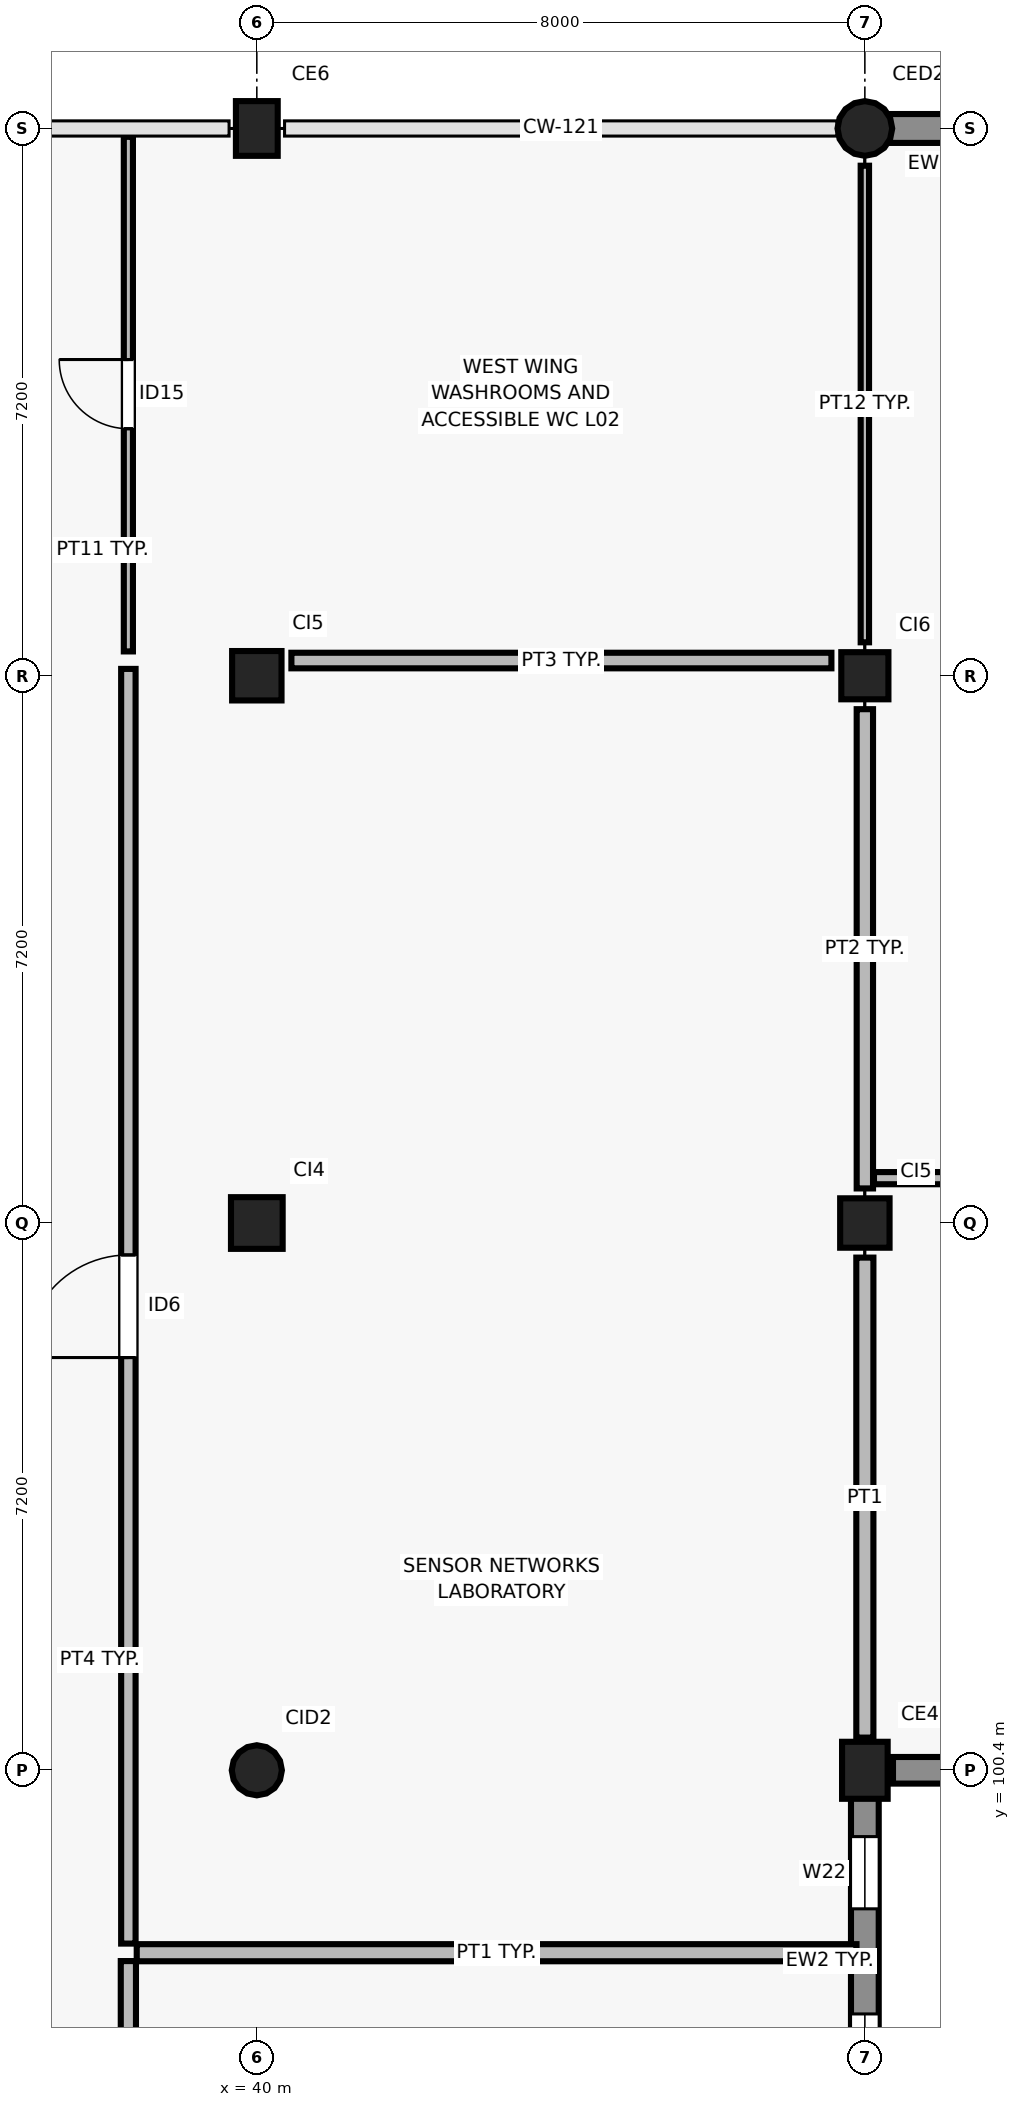
"""IFC4 building model, lengths in metres.
Left out: names, types, materials, properties, quantities, classifications, styles, units other than length and angle.
Written with IfcOpenShell. Run it as: python <this file> out.ifc"""

import sys

from ifc_helpers import new_model, si_unit, direction, frame, frame_2d, origin, origin_2d, place, context, subcontext, project, spatial, rectangle, circle, extrude, element, fill, save


model = new_model("IFC4")
c1 = context("Model", 3, precision=1e-05, world=origin(), true_north=direction((0.0, 1.0)))
c2 = subcontext(c1, "Body", "Model", "MODEL_VIEW")
j1 = project(units=[si_unit("LENGTHUNIT", "METRE"), si_unit("PLANEANGLEUNIT", "RADIAN")], contexts=[c1])
p1 = place(None, origin())
s1 = spatial("IfcSite", under=j1, at=p1, CompositionType="ELEMENT")
p2 = place(p1, origin())
s2 = spatial("IfcBuilding", under=s1, at=p2, CompositionType="ELEMENT")
p3 = place(p2, frame((0.0, 0.0, 9.0)))
s3 = spatial("IfcBuildingStorey", under=s2, at=p3, CompositionType="ELEMENT", Elevation=9.0)
p4 = place(p3, frame((40.0, 100.4, 0.0), z_axis=(0.0, 0.0, 1.0), x_axis=(1.0, 0.0, 0.0)))
e1 = element("IfcColumn", 1, at=p4, inside=s3, PredefinedType="COLUMN", context=c2, shape_type="SweptSolid", body=[
    extrude(circle(Radius=0.33, at=origin_2d()), origin(), (0.0, 0.0, 1.0), 4.2),
])
p5 = place(p3, frame((40.0, 107.6, 0.0), z_axis=(0.0, 0.0, 1.0), x_axis=(1.0, 0.0, 0.0)))
e2 = element("IfcColumn", 2, at=p5, inside=s3, PredefinedType="COLUMN", context=c2, shape_type="SweptSolid", body=[
    extrude(rectangle(XDim=0.68, YDim=0.68, at=origin_2d()), origin(), (0.0, 0.0, 1.0), 4.2),
])
p6 = place(p3, frame((40.0, 114.8, 0.0), z_axis=(0.0, 0.0, 1.0), x_axis=(1.0, 0.0, 0.0)))
e3 = element("IfcColumn", 3, at=p6, inside=s3, PredefinedType="COLUMN", context=c2, shape_type="SweptSolid", body=[
    extrude(rectangle(XDim=0.65, YDim=0.65, at=origin_2d()), origin(), (0.0, 0.0, 1.0), 4.2),
])
p7 = place(p3, frame((40.0, 122.0, 0.0), z_axis=(0.0, 0.0, 1.0), x_axis=(1.0, 0.0, 0.0)))
e4 = element("IfcColumn", 4, at=p7, inside=s3, PredefinedType="COLUMN", context=c2, shape_type="SweptSolid", body=[
    extrude(rectangle(XDim=0.72, YDim=0.55, at=origin_2d()), origin(), (0.0, 0.0, 1.0), 4.2),
])
p8 = place(p3, frame((48.0, 100.4, 0.0), z_axis=(0.0, 0.0, 1.0), x_axis=(1.0, 0.0, 0.0)))
e5 = element("IfcColumn", 5, at=p8, inside=s3, PredefinedType="COLUMN", context=c2, shape_type="SweptSolid", body=[
    extrude(rectangle(XDim=0.75, YDim=0.6, at=origin_2d()), origin(), (0.0, 0.0, 1.0), 4.2),
])
p9 = place(p3, frame((48.0, 107.6, 0.0), z_axis=(0.0, 0.0, 1.0), x_axis=(1.0, 0.0, 0.0)))
e6 = element("IfcColumn", 6, at=p9, inside=s3, PredefinedType="COLUMN", context=c2, shape_type="SweptSolid", body=[
    extrude(rectangle(XDim=0.65, YDim=0.65, at=origin_2d()), origin(), (0.0, 0.0, 1.0), 4.2),
])
p10 = place(p3, frame((48.0, 114.8, 0.0), z_axis=(0.0, 0.0, 1.0), x_axis=(1.0, 0.0, 0.0)))
e7 = element("IfcColumn", 7, at=p10, inside=s3, PredefinedType="COLUMN", context=c2, shape_type="SweptSolid", body=[
    extrude(rectangle(XDim=0.62, YDim=0.62, at=origin_2d()), origin(), (0.0, 0.0, 1.0), 4.2),
])
p11 = place(p3, frame((48.0, 122.0, 0.0), z_axis=(0.0, 0.0, 1.0), x_axis=(1.0, 0.0, 0.0)))
e8 = element("IfcColumn", 8, at=p11, inside=s3, PredefinedType="COLUMN", context=c2, shape_type="SweptSolid", body=[
    extrude(circle(Radius=0.36, at=origin_2d()), origin(), (0.0, 0.0, 1.0), 4.2),
])
p12 = place(p3, frame((48.0, 93.502, 0.0), z_axis=(0.0, 0.0, 1.0), x_axis=(0.0, 1.0, 0.0)))
e9 = element("IfcWall", 9, at=p12, inside=s3, PredefinedType="SOLIDWALL", context=c2, shape_type="SweptSolid", body=[
    extrude(rectangle(XDim=6.603, YDim=0.365, at=frame_2d((3.301, 0.0))), origin(), (0.0, 0.0, 1.0), 3.48),
])
p13 = place(p12, frame((0.806, 0.0, 0.9)))
e10 = element("IfcOpeningElement", 10, at=p13, cuts=e9, PredefinedType="OPENING", context=c2, shape_type="SweptSolid", body=[
    extrude(rectangle(XDim=1.2, YDim=1.5, at=frame_2d((0.6, 0.75))), frame((0.0, 0.192, 0.0), z_axis=(0.0, -1.0, 0.0), x_axis=(1.0, 0.0, 0.0)), (0.0, 0.0, 1.0), 0.385),
])
p14 = place(p12, frame((2.492, 0.0, 0.9)))
e11 = element("IfcOpeningElement", 11, at=p14, cuts=e9, PredefinedType="OPENING", context=c2, shape_type="SweptSolid", body=[
    extrude(rectangle(XDim=1.2, YDim=1.5, at=frame_2d((0.6, 0.75))), frame((0.0, 0.192, 0.0), z_axis=(0.0, -1.0, 0.0), x_axis=(1.0, 0.0, 0.0)), (0.0, 0.0, 1.0), 0.385),
])
p15 = place(p12, frame((5.075, 0.0, 0.9)))
e12 = element("IfcOpeningElement", 12, at=p15, cuts=e9, PredefinedType="OPENING", context=c2, shape_type="SweptSolid", body=[
    extrude(rectangle(XDim=0.95, YDim=1.25, at=frame_2d((0.475, 0.625))), frame((0.0, 0.192, 0.0), z_axis=(0.0, -1.0, 0.0), x_axis=(1.0, 0.0, 0.0)), (0.0, 0.0, 1.0), 0.385),
])
p16 = place(p3, frame((48.37, 100.4, 0.0), z_axis=(0.0, 0.0, 1.0), x_axis=(1.0, 0.0, 0.0)))
e13 = element("IfcWall", 13, at=p16, inside=s3, PredefinedType="SOLIDWALL", context=c2, shape_type="SweptSolid", body=[
    extrude(rectangle(XDim=7.26, YDim=0.35, at=frame_2d((3.63, 0.0))), origin(), (0.0, 0.0, 1.0), 3.24),
])
p17 = place(p16, frame((1.327, 0.0, 0.9)))
e14 = element("IfcOpeningElement", 14, at=p17, cuts=e13, PredefinedType="OPENING", context=c2, shape_type="SweptSolid", body=[
    extrude(rectangle(XDim=1.8, YDim=1.25, at=frame_2d((0.9, 0.625))), frame((0.0, 0.185, 0.0), z_axis=(0.0, -1.0, 0.0), x_axis=(1.0, 0.0, 0.0)), (0.0, 0.0, 1.0), 0.37),
])
p18 = place(p16, frame((4.133, 0.0, 0.9)))
e15 = element("IfcOpeningElement", 15, at=p18, cuts=e13, PredefinedType="OPENING", context=c2, shape_type="SweptSolid", body=[
    extrude(rectangle(XDim=1.8, YDim=1.25, at=frame_2d((0.9, 0.625))), frame((0.0, 0.185, 0.0), z_axis=(0.0, -1.0, 0.0), x_axis=(1.0, 0.0, 0.0)), (0.0, 0.0, 1.0), 0.37),
])
p19 = place(p3, frame((55.63, 122.0, 0.0), z_axis=(0.0, 0.0, 1.0), x_axis=(-1.0, 0.0, 0.0)))
e16 = element("IfcWall", 16, at=p19, inside=s3, PredefinedType="SOLIDWALL", context=c2, shape_type="SweptSolid", body=[
    extrude(rectangle(XDim=7.327, YDim=0.38, at=frame_2d((3.664, 0.0))), origin(), (0.0, 0.0, 1.0), 3.27),
])
p20 = place(p19, frame((1.349, 0.0, 0.9)))
e17 = element("IfcOpeningElement", 17, at=p20, cuts=e16, PredefinedType="OPENING", context=c2, shape_type="SweptSolid", body=[
    extrude(rectangle(XDim=1.8, YDim=1.5, at=frame_2d((0.9, 0.75))), frame((0.0, 0.2, 0.0), z_axis=(0.0, -1.0, 0.0), x_axis=(1.0, 0.0, 0.0)), (0.0, 0.0, 1.0), 0.4),
])
p21 = place(p19, frame((4.178, 0.0, 0.9)))
e18 = element("IfcOpeningElement", 18, at=p21, cuts=e16, PredefinedType="OPENING", context=c2, shape_type="SweptSolid", body=[
    extrude(rectangle(XDim=1.8, YDim=1.5, at=frame_2d((0.9, 0.75))), frame((0.0, 0.2, 0.0), z_axis=(0.0, -1.0, 0.0), x_axis=(1.0, 0.0, 0.0)), (0.0, 0.0, 1.0), 0.4),
])
p22 = place(p3, frame((38.42, 98.0, 0.0), z_axis=(0.0, 0.0, 1.0), x_axis=(1.0, 0.0, 0.0)))
e19 = element("IfcWall", 19, at=p22, inside=s3, PredefinedType="PARTITIONING", context=c2, shape_type="SweptSolid", body=[
    extrude(rectangle(XDim=9.47, YDim=0.225, at=frame_2d((4.735, 0.0))), origin(), (0.0, 0.0, 1.0), 3.9),
])
p23 = place(p3, frame((38.31, 74.12, 0.0), z_axis=(0.0, 0.0, 1.0), x_axis=(0.0, 1.0, 0.0)))
e20 = element("IfcWall", 20, at=p23, inside=s3, PredefinedType="SOLIDWALL", context=c2, shape_type="SweptSolid", body=[
    extrude(rectangle(XDim=23.77, YDim=0.2, at=frame_2d((11.885, 0.0))), origin(), (0.0, 0.0, 1.0), 3.9),
])
p24 = place(p23, frame((11.245, 0.0, 0.0)))
e21 = element("IfcOpeningElement", 21, at=p24, cuts=e20, PredefinedType="OPENING", context=c2, shape_type="SweptSolid", body=[
    extrude(rectangle(XDim=1.28, YDim=2.2, at=frame_2d((0.64, 1.1))), frame((0.0, 0.11, 0.0), z_axis=(0.0, -1.0, 0.0), x_axis=(1.0, 0.0, 0.0)), (0.0, 0.0, 1.0), 0.22),
])
p25 = place(p3, frame((40.455, 115.0, 0.0), z_axis=(0.0, 0.0, 1.0), x_axis=(1.0, 0.0, 0.0)))
e22 = element("IfcWall", 22, at=p25, inside=s3, PredefinedType="PARTITIONING", context=c2, shape_type="SweptSolid", body=[
    extrude(rectangle(XDim=7.105, YDim=0.205, at=frame_2d((3.552, 0.0))), origin(), (0.0, 0.0, 1.0), 3.2),
])
p26 = place(p3, frame((38.31, 98.12, 0.0), z_axis=(0.0, 0.0, 1.0), x_axis=(0.0, 1.0, 0.0)))
e23 = element("IfcWall", 23, at=p26, inside=s3, PredefinedType="PARTITIONING", context=c2, shape_type="SweptSolid", body=[
    extrude(rectangle(XDim=16.77, YDim=0.19, at=frame_2d((8.385, 0.0))), origin(), (0.0, 0.0, 1.0), 3.9),
])
p27 = place(p26, frame((7.71, 0.0, 0.0)))
e24 = element("IfcOpeningElement", 24, at=p27, cuts=e23, PredefinedType="OPENING", context=c2, shape_type="SweptSolid", body=[
    extrude(rectangle(XDim=1.35, YDim=2.2, at=frame_2d((0.675, 1.1))), frame((0.0, 0.105, 0.0), z_axis=(0.0, -1.0, 0.0), x_axis=(1.0, 0.0, 0.0)), (0.0, 0.0, 1.0), 0.21),
])
p28 = place(p3, frame((48.0, 100.83, 0.0), z_axis=(0.0, 0.0, 1.0), x_axis=(0.0, 1.0, 0.0)))
e25 = element("IfcWall", 25, at=p28, inside=s3, PredefinedType="PARTITIONING", context=c2, shape_type="SweptSolid", body=[
    extrude(rectangle(XDim=6.315, YDim=0.225, at=frame_2d((3.157, 0.0))), origin(), (0.0, 0.0, 1.0), 3.4),
])
p29 = place(p3, frame((48.0, 108.055, 0.0), z_axis=(0.0, 0.0, 1.0), x_axis=(0.0, 1.0, 0.0)))
e26 = element("IfcWall", 26, at=p29, inside=s3, PredefinedType="PARTITIONING", context=c2, shape_type="SweptSolid", body=[
    extrude(rectangle(XDim=6.305, YDim=0.215, at=frame_2d((3.153, 0.0))), origin(), (0.0, 0.0, 1.0), 3.44),
])
p30 = place(p3, frame((38.31, 115.12, 0.0), z_axis=(0.0, 0.0, 1.0), x_axis=(0.0, 1.0, 0.0)))
e27 = element("IfcWall", 27, at=p30, inside=s3, PredefinedType="PARTITIONING", context=c2, shape_type="SweptSolid", body=[
    extrude(rectangle(XDim=6.77, YDim=0.12, at=frame_2d((3.385, 0.0))), origin(), (0.0, 0.0, 1.0), 3.9),
])
p31 = place(p30, frame((2.93, 0.0, 0.0)))
e28 = element("IfcOpeningElement", 28, at=p31, cuts=e27, PredefinedType="OPENING", context=c2, shape_type="SweptSolid", body=[
    extrude(rectangle(XDim=0.91, YDim=2.1, at=frame_2d((0.455, 1.05))), frame((0.0, 0.07, 0.0), z_axis=(0.0, -1.0, 0.0), x_axis=(1.0, 0.0, 0.0)), (0.0, 0.0, 1.0), 0.14),
])
p32 = place(p3, frame((48.0, 115.24, 0.0), z_axis=(0.0, 0.0, 1.0), x_axis=(0.0, 1.0, 0.0)))
e29 = element("IfcWall", 29, at=p32, inside=s3, PredefinedType="PARTITIONING", context=c2, shape_type="SweptSolid", body=[
    extrude(rectangle(XDim=6.27, YDim=0.11, at=frame_2d((3.135, 0.0))), origin(), (0.0, 0.0, 1.0), 3.47),
])
p33 = place(p3, frame((48.12, 108.19, 0.0), z_axis=(0.0, 0.0, 1.0), x_axis=(1.0, 0.0, 0.0)))
e30 = element("IfcWall", 30, at=p33, inside=s3, PredefinedType="PARTITIONING", context=c2, shape_type="SweptSolid", body=[
    extrude(rectangle(XDim=47.77, YDim=0.16, at=frame_2d((23.885, 0.0))), origin(), (0.0, 0.0, 1.0), 3.9),
])
p34 = place(p33, frame((19.188, 0.0, 0.0)))
e31 = element("IfcOpeningElement", 31, at=p34, cuts=e30, PredefinedType="OPENING", context=c2, shape_type="SweptSolid", body=[
    extrude(rectangle(XDim=1.75, YDim=2.25, at=frame_2d((0.875, 1.125))), frame((0.0, 0.09, 0.0), z_axis=(0.0, -1.0, 0.0), x_axis=(1.0, 0.0, 0.0)), (0.0, 0.0, 1.0), 0.18),
])
p35 = place(p14, origin())
e32 = element("IfcWindow", 32, at=p35, inside=s3, PartitioningType="SINGLE_PANEL", PredefinedType="WINDOW", context=c2, shape_type="SweptSolid", body=[
    extrude(rectangle(XDim=1.2, YDim=1.5, at=frame_2d((0.6, 0.75))), frame((0.0, 0.03, 0.0), z_axis=(0.0, -1.0, 0.0), x_axis=(1.0, 0.0, 0.0)), (0.0, 0.0, 1.0), 0.06),
])
fill(e11, e32)
p36 = place(p15, origin())
e33 = element("IfcWindow", 33, at=p36, inside=s3, PartitioningType="SINGLE_PANEL", PredefinedType="WINDOW", context=c2, shape_type="SweptSolid", body=[
    extrude(rectangle(XDim=0.95, YDim=1.25, at=frame_2d((0.475, 0.625))), frame((0.0, 0.03, 0.0), z_axis=(0.0, -1.0, 0.0), x_axis=(1.0, 0.0, 0.0)), (0.0, 0.0, 1.0), 0.06),
])
fill(e12, e33)
p37 = place(p27, origin())
e34 = element("IfcDoor", 34, at=p37, inside=s3, OperationType="SINGLE_SWING_LEFT", PredefinedType="DOOR", context=c2, shape_type="SweptSolid", body=[
    extrude(rectangle(XDim=1.35, YDim=2.2, at=frame_2d((0.675, 1.1))), frame((0.0, 0.025, 0.0), z_axis=(0.0, -1.0, 0.0), x_axis=(1.0, 0.0, 0.0)), (0.0, 0.0, 1.0), 0.05),
])
fill(e24, e34)
p38 = place(p31, origin())
e35 = element("IfcDoor", 35, at=p38, inside=s3, OperationType="SINGLE_SWING_RIGHT", PredefinedType="DOOR", context=c2, shape_type="SweptSolid", body=[
    extrude(rectangle(XDim=0.91, YDim=2.1, at=frame_2d((0.455, 1.05))), frame((0.0, 0.025, 0.0), z_axis=(0.0, -1.0, 0.0), x_axis=(1.0, 0.0, 0.0)), (0.0, 0.0, 1.0), 0.05),
])
fill(e28, e35)
save(model, sys.argv[1])
